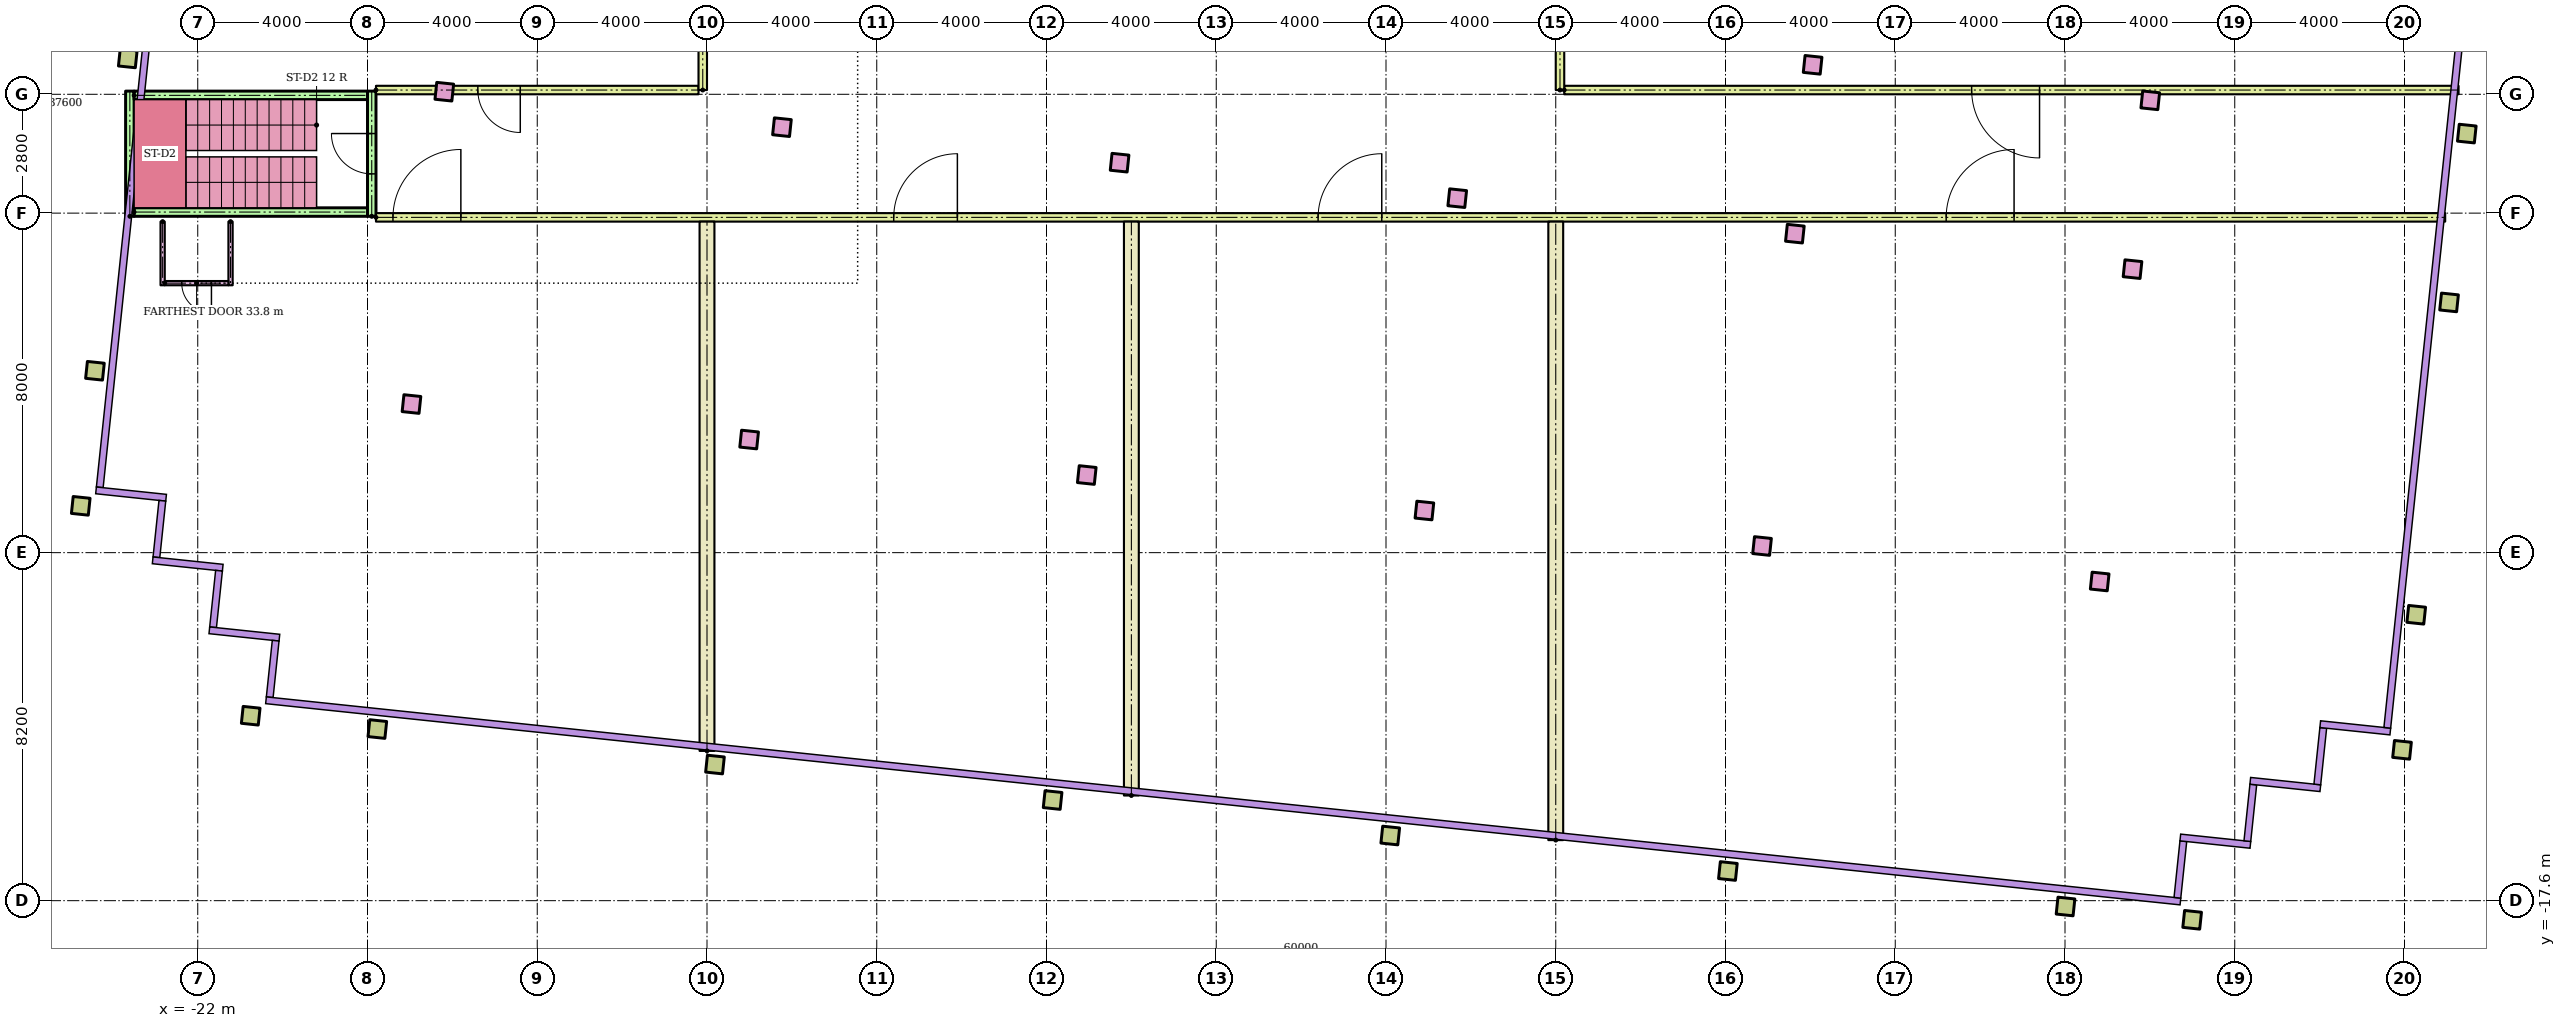
"""IFC4 building model, lengths in metres.
Left out: names, types, materials, properties, quantities, classifications, styles, units other than length and angle.
Written with IfcOpenShell. Run it as: python <this file> out.ifc"""

import sys

from ifc_helpers import new_model, si_unit, direction, frame, frame_2d, origin, origin_2d, place, context, subcontext, project, spatial, rectangle, hollow_rectangle, extrude, element, fill, save


model = new_model("IFC4")
c1 = context("Model", 3, precision=1e-05, world=origin(), true_north=direction((0.0, 1.0)))
c2 = subcontext(c1, "Body", "Model", "MODEL_VIEW")
j1 = project(units=[si_unit("LENGTHUNIT", "METRE"), si_unit("PLANEANGLEUNIT", "RADIAN")], contexts=[c1])
p1 = place(None, origin())
s1 = spatial("IfcSite", under=j1, at=p1, CompositionType="ELEMENT")
p2 = place(p1, origin())
s2 = spatial("IfcBuilding", under=s1, at=p2, CompositionType="ELEMENT")
p3 = place(p2, frame((0.0, 0.0, 309.2)))
s3 = spatial("IfcBuildingStorey", under=s2, at=p3, CompositionType="ELEMENT", Elevation=309.2)
for number, where, z_axis, x_axis in (
    (1, (-20.752, -13.243, 0.0), (0.0, 0.0, 1.0), (0.995, -0.105, 0.0)),
    (2, (-17.768, -13.556, 0.0), (0.0, 0.0, 1.0), (0.995, -0.105, 0.0)),
    (3, (-9.812, -14.392, 0.0), (0.0, 0.0, 1.0), (0.995, -0.105, 0.0)),
    (4, (-1.856, -15.229, 0.0), (0.0, 0.0, 1.0), (0.995, -0.105, 0.0)),
    (5, (6.1, -16.065, 0.0), (0.0, 0.0, 1.0), (0.995, -0.105, 0.0)),
    (6, (14.056, -16.901, 0.0), (0.0, 0.0, 1.0), (0.995, -0.105, 0.0)),
    (7, (22.012, -17.737, 0.0), (0.0, 0.0, 1.0), (0.995, -0.105, 0.0)),
    (8, (24.996, -18.051, 0.0), (0.0, 0.0, 1.0), (0.995, -0.105, 0.0)),
    (9, (-24.757, -8.297, 0.0), (0.0, 0.0, 1.0), (0.995, -0.105, 0.0)),
    (10, (29.942, -14.046, 0.0), (0.0, 0.0, 1.0), (0.995, -0.105, 0.0)),
    (11, (-24.423, -5.115, 0.0), (0.0, 0.0, 1.0), (0.995, -0.105, 0.0)),
):
    element("IfcColumn", number, at=place(p3, frame(where, z_axis=z_axis, x_axis=x_axis)), inside=s3, PredefinedType="COLUMN", context=c2, shape_type="SweptSolid", body=[
        extrude(hollow_rectangle(XDim=0.4, YDim=0.4, WallThickness=0.02, at=origin_2d()), origin(), (0.0, 0.0, 1.0), 3.78),
    ])
for number, where, z_axis, x_axis in (
    (12, (-16.964, -5.898, 0.0), (0.0, 0.0, 1.0), (0.995, -0.105, 0.0)),
    (13, (-9.007, -6.735, 0.0), (0.0, 0.0, 1.0), (0.995, -0.105, 0.0)),
    (14, (-1.051, -7.571, 0.0), (0.0, 0.0, 1.0), (0.995, -0.105, 0.0)),
    (15, (6.905, -8.407, 0.0), (0.0, 0.0, 1.0), (0.995, -0.105, 0.0)),
    (16, (14.861, -9.243, 0.0), (0.0, 0.0, 1.0), (0.995, -0.105, 0.0)),
    (17, (22.817, -10.08, 0.0), (0.0, 0.0, 1.0), (0.995, -0.105, 0.0)),
):
    element("IfcColumn", number, at=place(p3, frame(where, z_axis=z_axis, x_axis=x_axis)), inside=s3, PredefinedType="COLUMN", context=c2, shape_type="SweptSolid", body=[
        extrude(rectangle(XDim=0.4, YDim=0.4, at=origin_2d()), origin(), (0.0, 0.0, 1.0), 3.78),
    ])
for number, where, z_axis, x_axis in (
    (18, (30.276, -10.864, 0.0), (0.0, 0.0, 1.0), (0.995, -0.105, 0.0)),
    (19, (-23.649, 2.245, 0.0), (0.0, 0.0, 1.0), (0.995, -0.105, 0.0)),
):
    element("IfcColumn", number, at=place(p3, frame(where, z_axis=z_axis, x_axis=x_axis)), inside=s3, PredefinedType="COLUMN", context=c2, shape_type="SweptSolid", body=[
        extrude(hollow_rectangle(XDim=0.4, YDim=0.4, WallThickness=0.02, at=origin_2d()), origin(), (0.0, 0.0, 1.0), 3.78),
    ])
for number, where, z_axis, x_axis in (
    (20, (-16.19, 1.461, 0.0), (0.0, 0.0, 1.0), (0.995, -0.105, 0.0)),
    (21, (-8.234, 0.625, 0.0), (0.0, 0.0, 1.0), (0.995, -0.105, 0.0)),
    (22, (-0.278, -0.211, 0.0), (0.0, 0.0, 1.0), (0.995, -0.105, 0.0)),
    (23, (7.678, -1.048, 0.0), (0.0, 0.0, 1.0), (0.995, -0.105, 0.0)),
    (24, (15.635, -1.884, 0.0), (0.0, 0.0, 1.0), (0.995, -0.105, 0.0)),
    (25, (23.591, -2.72, 0.0), (0.0, 0.0, 1.0), (0.995, -0.105, 0.0)),
):
    element("IfcColumn", number, at=place(p3, frame(where, z_axis=z_axis, x_axis=x_axis)), inside=s3, PredefinedType="COLUMN", context=c2, shape_type="SweptSolid", body=[
        extrude(rectangle(XDim=0.4, YDim=0.4, at=origin_2d()), origin(), (0.0, 0.0, 1.0), 3.78),
    ])
p4 = place(p3, frame((31.05, -3.504, 0.0), z_axis=(0.0, 0.0, 1.0), x_axis=(0.994521895368, -0.104528463268, 0.0)))
e26 = element("IfcColumn", 26, at=p4, inside=s3, PredefinedType="COLUMN", context=c2, shape_type="SweptSolid", body=[
    extrude(hollow_rectangle(XDim=0.4, YDim=0.4, WallThickness=0.02, at=origin_2d()), origin(), (0.0, 0.0, 1.0), 3.78),
])
for number, where, z_axis, x_axis in (
    (27, (16.053, 2.094, 0.0), (0.0, 0.0, 1.0), (0.995, -0.105, 0.0)),
    (28, (24.009, 1.258, 0.0), (0.0, 0.0, 1.0), (0.995, -0.105, 0.0)),
):
    element("IfcColumn", number, at=place(p3, frame(where, z_axis=z_axis, x_axis=x_axis)), inside=s3, PredefinedType="COLUMN", context=c2, shape_type="SweptSolid", body=[
        extrude(rectangle(XDim=0.4, YDim=0.4, at=origin_2d()), origin(), (0.0, 0.0, 1.0), 3.78),
    ])
p5 = place(p3, frame((31.468, 0.474, 0.0), z_axis=(0.0, 0.0, 1.0), x_axis=(0.994521895368, -0.104528463268, 0.0)))
e29 = element("IfcColumn", 29, at=p5, inside=s3, PredefinedType="COLUMN", context=c2, shape_type="SweptSolid", body=[
    extrude(hollow_rectangle(XDim=0.4, YDim=0.4, WallThickness=0.02, at=origin_2d()), origin(), (0.0, 0.0, 1.0), 3.78),
])
p6 = place(p3, frame((-17.8, -1.5, 0.0)))
e30 = element("IfcWall", 30, at=p6, inside=s3, PredefinedType="PARTITIONING", context=c2, shape_type="SweptSolid", body=[
    extrude(rectangle(XDim=48.759, YDim=0.2, at=frame_2d((24.379, 0.0))), origin(), (0.0, 0.0, 1.0), 3.78),
])
p7 = place(p6, frame((0.4, 0.0, 0.0)))
e31 = element("IfcOpeningElement", 31, at=p7, cuts=e30, PredefinedType="OPENING", context=c2, shape_type="SweptSolid", body=[
    extrude(rectangle(XDim=1.6, YDim=2.4, at=frame_2d((0.8, 1.2))), frame((0.0, 0.11, 0.0), z_axis=(0.0, -1.0, 0.0), x_axis=(1.0, 0.0, 0.0)), (0.0, 0.0, 1.0), 0.22),
])
p8 = place(p6, frame((12.2, 0.0, 0.0)))
e32 = element("IfcOpeningElement", 32, at=p8, cuts=e30, PredefinedType="OPENING", context=c2, shape_type="SweptSolid", body=[
    extrude(rectangle(XDim=1.5, YDim=2.1, at=frame_2d((0.75, 1.05))), frame((0.0, 0.11, 0.0), z_axis=(0.0, -1.0, 0.0), x_axis=(1.0, 0.0, 0.0)), (0.0, 0.0, 1.0), 0.22),
])
p9 = place(p6, frame((22.2, 0.0, 0.0)))
e33 = element("IfcOpeningElement", 33, at=p9, cuts=e30, PredefinedType="OPENING", context=c2, shape_type="SweptSolid", body=[
    extrude(rectangle(XDim=1.5, YDim=2.1, at=frame_2d((0.75, 1.05))), frame((0.0, 0.11, 0.0), z_axis=(0.0, -1.0, 0.0), x_axis=(1.0, 0.0, 0.0)), (0.0, 0.0, 1.0), 0.22),
])
p10 = place(p6, frame((37.0, 0.0, 0.0)))
e34 = element("IfcOpeningElement", 34, at=p10, cuts=e30, PredefinedType="OPENING", context=c2, shape_type="SweptSolid", body=[
    extrude(rectangle(XDim=1.6, YDim=2.4, at=frame_2d((0.8, 1.2))), frame((0.0, 0.11, 0.0), z_axis=(0.0, -1.0, 0.0), x_axis=(1.0, 0.0, 0.0)), (0.0, 0.0, 1.0), 0.22),
])
p11 = place(p3, frame((-17.8, 1.5, 0.0)))
e35 = element("IfcWall", 35, at=p11, inside=s3, PredefinedType="PARTITIONING", context=c2, shape_type="SweptSolid", body=[
    extrude(rectangle(XDim=7.6, YDim=0.2, at=frame_2d((3.8, 0.0))), origin(), (0.0, 0.0, 1.0), 3.78),
])
p12 = place(p11, frame((2.4, 0.0, 0.0)))
e36 = element("IfcOpeningElement", 36, at=p12, cuts=e35, PredefinedType="OPENING", context=c2, shape_type="SweptSolid", body=[
    extrude(rectangle(XDim=1.0, YDim=2.4, at=frame_2d((0.5, 1.2))), frame((0.0, 0.11, 0.0), z_axis=(0.0, -1.0, 0.0), x_axis=(1.0, 0.0, 0.0)), (0.0, 0.0, 1.0), 0.22),
])
p13 = place(p3, frame((10.2, 1.5, 0.0)))
e37 = element("IfcWall", 37, at=p13, inside=s3, PredefinedType="PARTITIONING", context=c2, shape_type="SweptSolid", body=[
    extrude(rectangle(XDim=21.074, YDim=0.2, at=frame_2d((10.537, 0.0))), origin(), (0.0, 0.0, 1.0), 3.78),
])
p14 = place(p13, frame((9.6, 0.0, 0.0)))
e38 = element("IfcOpeningElement", 38, at=p14, cuts=e37, PredefinedType="OPENING", context=c2, shape_type="SweptSolid", body=[
    extrude(rectangle(XDim=1.6, YDim=2.4, at=frame_2d((0.8, 1.2))), frame((0.0, 0.11, 0.0), z_axis=(0.0, -1.0, 0.0), x_axis=(1.0, 0.0, 0.0)), (0.0, 0.0, 1.0), 0.22),
])
for number, where, z_axis, x_axis in (
    (39, (-10.1, 1.5, 0.0), (0.0, 0.0, 1.0), (0.0, 1.0, 0.0)),
    (40, (10.1, 1.5, 0.0), (0.0, 0.0, 1.0), (0.0, 1.0, 0.0)),
):
    element("IfcWall", number, at=place(p3, frame(where, z_axis=z_axis, x_axis=x_axis)), inside=s3, PredefinedType="PARTITIONING", context=c2, shape_type="SweptSolid", body=[
        extrude(rectangle(XDim=4.9, YDim=0.2, at=frame_2d((2.45, 0.0))), origin(), (0.0, 0.0, 1.0), 3.78),
    ])
p15 = place(p3, frame((-17.9, -1.475, 0.0), z_axis=(0.0, 0.0, 1.0), x_axis=(0.0, 1.0, 0.0)))
e41 = element("IfcWall", 41, at=p15, inside=s3, PredefinedType="SHEAR", context=c2, shape_type="SweptSolid", body=[
    extrude(rectangle(XDim=2.95, YDim=0.2, at=frame_2d((1.475, 0.0))), origin(), (0.0, 0.0, 1.0), 3.78),
])
p16 = place(p15, frame((1.0, 0.0, 0.0)))
e42 = element("IfcOpeningElement", 42, at=p16, cuts=e41, PredefinedType="OPENING", context=c2, shape_type="SweptSolid", body=[
    extrude(rectangle(XDim=0.95, YDim=2.1, at=frame_2d((0.475, 1.05))), frame((0.0, 0.11, 0.0), z_axis=(0.0, -1.0, 0.0), x_axis=(1.0, 0.0, 0.0)), (0.0, 0.0, 1.0), 0.22),
])
p17 = place(p3, frame((-23.6, -1.475, 0.0), z_axis=(0.0, 0.0, 1.0), x_axis=(0.0, 1.0, 0.0)))
e43 = element("IfcWall", 43, at=p17, inside=s3, PredefinedType="SHEAR", context=c2, shape_type="SweptSolid", body=[
    extrude(rectangle(XDim=2.95, YDim=0.2, at=frame_2d((1.475, 0.0))), origin(), (0.0, 0.0, 1.0), 3.78),
])
for number, where in (
    (44, (-23.5, -1.375, 0.0)),
    (45, (-23.5, 1.375, 0.0)),
):
    element("IfcWall", number, at=place(p3, frame(where)), inside=s3, PredefinedType="SHEAR", context=c2, shape_type="SweptSolid", body=[
        extrude(rectangle(XDim=5.5, YDim=0.2, at=frame_2d((2.75, 0.0))), origin(), (0.0, 0.0, 1.0), 3.78),
    ])
for number, where, z_axis, x_axis in (
    (46, (-22.827, -1.6, 0.0), (0.0, 0.0, 1.0), (0.0, -1.0, 0.0)),
    (47, (-21.227, -1.6, 0.0), (0.0, 0.0, 1.0), (0.0, -1.0, 0.0)),
):
    element("IfcWall", number, at=place(p3, frame(where, z_axis=z_axis, x_axis=x_axis)), inside=s3, PredefinedType="PARTITIONING", context=c2, shape_type="SweptSolid", body=[
        extrude(rectangle(XDim=1.5, YDim=0.1, at=frame_2d((0.75, 0.0))), origin(), (0.0, 0.0, 1.0), 3.78),
    ])
p18 = place(p3, frame((-22.777, -3.05, 0.0)))
e48 = element("IfcWall", 48, at=p18, inside=s3, PredefinedType="PARTITIONING", context=c2, shape_type="SweptSolid", body=[
    extrude(rectangle(XDim=1.5, YDim=0.1, at=frame_2d((0.75, 0.0))), origin(), (0.0, 0.0, 1.0), 3.78),
])
p19 = place(p18, frame((0.4, 0.0, 0.0)))
e49 = element("IfcOpeningElement", 49, at=p19, cuts=e48, PredefinedType="OPENING", context=c2, shape_type="SweptSolid", body=[
    extrude(rectangle(XDim=0.7, YDim=2.0, at=frame_2d((0.35, 1.0))), frame((0.0, 0.06, 0.0), z_axis=(0.0, -1.0, 0.0), x_axis=(1.0, 0.0, 0.0)), (0.0, 0.0, 1.0), 0.12),
])
p20 = place(p3, frame((-10.0, -14.071, 0.0), z_axis=(0.0, 0.0, 1.0), x_axis=(0.0, 1.0, 0.0)))
e50 = element("IfcWall", 50, at=p20, inside=s3, PredefinedType="PARTITIONING", context=c2, shape_type="SweptSolid", body=[
    extrude(rectangle(XDim=12.471, YDim=0.35, at=frame_2d((6.235, 0.0))), origin(), (0.0, 0.0, 1.0), 3.78),
])
p21 = place(p3, frame((0.0, -15.122, 0.0), z_axis=(0.0, 0.0, 1.0), x_axis=(0.0, 1.0, 0.0)))
e51 = element("IfcWall", 51, at=p21, inside=s3, PredefinedType="PARTITIONING", context=c2, shape_type="SweptSolid", body=[
    extrude(rectangle(XDim=13.522, YDim=0.35, at=frame_2d((6.761, 0.0))), origin(), (0.0, 0.0, 1.0), 3.78),
])
p22 = place(p3, frame((10.0, -16.173, 0.0), z_axis=(0.0, 0.0, 1.0), x_axis=(0.0, 1.0, 0.0)))
e52 = element("IfcWall", 52, at=p22, inside=s3, PredefinedType="PARTITIONING", context=c2, shape_type="SweptSolid", body=[
    extrude(rectangle(XDim=14.573, YDim=0.35, at=frame_2d((7.287, 0.0))), origin(), (0.0, 0.0, 1.0), 3.78),
])
p23 = place(p16, origin())
e53 = element("IfcDoor", 53, at=p23, inside=s3, OperationType="SINGLE_SWING_RIGHT", PredefinedType="DOOR", context=c2, shape_type="SweptSolid", body=[
    extrude(rectangle(XDim=0.95, YDim=2.1, at=frame_2d((0.475, 1.05))), frame((0.0, 0.025, 0.0), z_axis=(0.0, -1.0, 0.0), x_axis=(1.0, 0.0, 0.0)), (0.0, 0.0, 1.0), 0.05),
])
fill(e42, e53)
p24 = place(p7, origin())
e54 = element("IfcDoor", 54, at=p24, inside=s3, OperationType="DOUBLE_DOOR_SINGLE_SWING", PredefinedType="DOOR", context=c2, shape_type="SweptSolid", body=[
    extrude(rectangle(XDim=1.6, YDim=2.4, at=frame_2d((0.8, 1.2))), frame((0.0, 0.025, 0.0), z_axis=(0.0, -1.0, 0.0), x_axis=(1.0, 0.0, 0.0)), (0.0, 0.0, 1.0), 0.05),
])
fill(e31, e54)
p25 = place(p19, frame((0.7, 0.0, 0.0), z_axis=(0.0, 0.0, 1.0), x_axis=(-1.0, 0.0, 0.0)))
e55 = element("IfcDoor", 55, at=p25, inside=s3, OperationType="SINGLE_SWING_RIGHT", PredefinedType="DOOR", context=c2, shape_type="SweptSolid", body=[
    extrude(rectangle(XDim=0.7, YDim=2.0, at=frame_2d((0.35, 1.0))), frame((0.0, 0.025, 0.0), z_axis=(0.0, -1.0, 0.0), x_axis=(1.0, 0.0, 0.0)), (0.0, 0.0, 1.0), 0.05),
])
fill(e49, e55)
p26 = place(p8, origin())
e56 = element("IfcDoor", 56, at=p26, inside=s3, OperationType="DOUBLE_DOOR_SINGLE_SWING", PredefinedType="DOOR", context=c2, shape_type="SweptSolid", body=[
    extrude(rectangle(XDim=1.5, YDim=2.1, at=frame_2d((0.75, 1.05))), frame((0.0, 0.025, 0.0), z_axis=(0.0, -1.0, 0.0), x_axis=(1.0, 0.0, 0.0)), (0.0, 0.0, 1.0), 0.05),
])
fill(e32, e56)
p27 = place(p9, origin())
e57 = element("IfcDoor", 57, at=p27, inside=s3, OperationType="DOUBLE_DOOR_SINGLE_SWING", PredefinedType="DOOR", context=c2, shape_type="SweptSolid", body=[
    extrude(rectangle(XDim=1.5, YDim=2.1, at=frame_2d((0.75, 1.05))), frame((0.0, 0.025, 0.0), z_axis=(0.0, -1.0, 0.0), x_axis=(1.0, 0.0, 0.0)), (0.0, 0.0, 1.0), 0.05),
])
fill(e33, e57)
p28 = place(p10, origin())
e58 = element("IfcDoor", 58, at=p28, inside=s3, OperationType="DOUBLE_DOOR_SINGLE_SWING", PredefinedType="DOOR", context=c2, shape_type="SweptSolid", body=[
    extrude(rectangle(XDim=1.6, YDim=2.4, at=frame_2d((0.8, 1.2))), frame((0.0, 0.025, 0.0), z_axis=(0.0, -1.0, 0.0), x_axis=(1.0, 0.0, 0.0)), (0.0, 0.0, 1.0), 0.05),
])
fill(e34, e58)
p29 = place(p12, frame((1.0, 0.0, 0.0), z_axis=(0.0, 0.0, 1.0), x_axis=(-1.0, 0.0, 0.0)))
e59 = element("IfcDoor", 59, at=p29, inside=s3, OperationType="SINGLE_SWING_RIGHT", PredefinedType="DOOR", context=c2, shape_type="SweptSolid", body=[
    extrude(rectangle(XDim=1.0, YDim=2.4, at=frame_2d((0.5, 1.2))), frame((0.0, 0.025, 0.0), z_axis=(0.0, -1.0, 0.0), x_axis=(1.0, 0.0, 0.0)), (0.0, 0.0, 1.0), 0.05),
])
fill(e36, e59)
p30 = place(p14, frame((1.6, 0.0, 0.0), z_axis=(0.0, 0.0, 1.0), x_axis=(-1.0, 0.0, 0.0)))
e60 = element("IfcDoor", 60, at=p30, inside=s3, OperationType="DOUBLE_DOOR_SINGLE_SWING", PredefinedType="DOOR", context=c2, shape_type="SweptSolid", body=[
    extrude(rectangle(XDim=1.6, YDim=2.4, at=frame_2d((0.8, 1.2))), frame((0.0, 0.025, 0.0), z_axis=(0.0, -1.0, 0.0), x_axis=(1.0, 0.0, 0.0)), (0.0, 0.0, 1.0), 0.05),
])
fill(e38, e60)
save(model, sys.argv[1])
